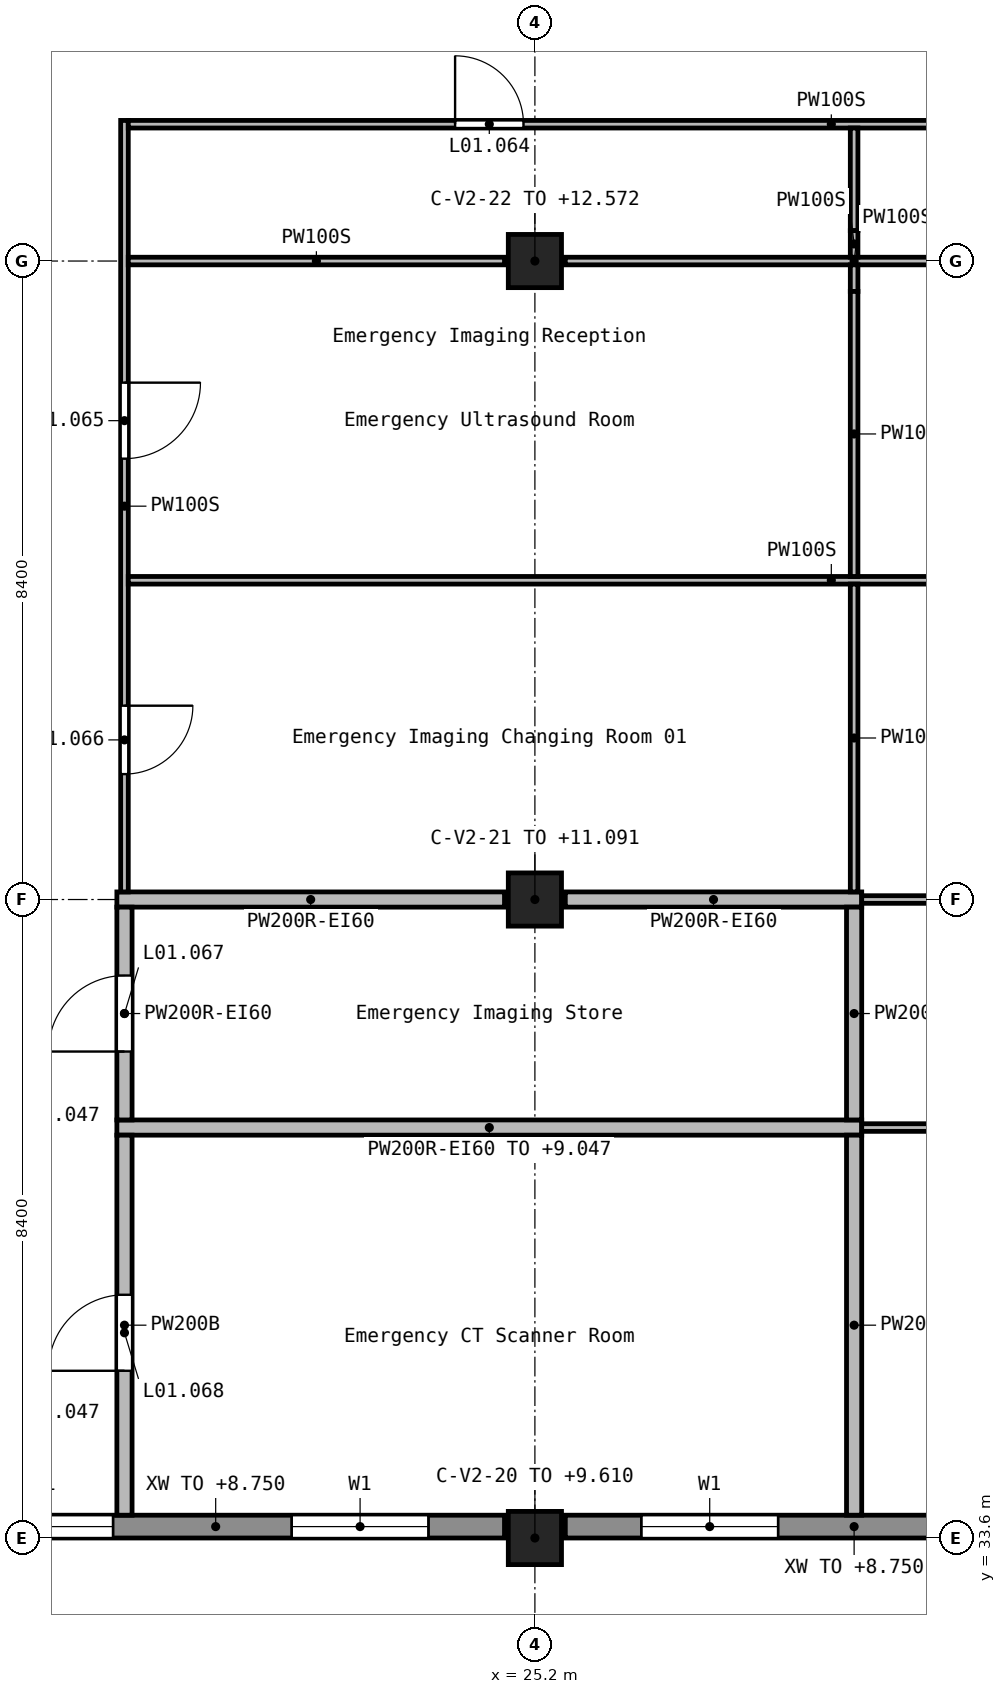
"""IFC4 building model, lengths in metres.
Left out: names, types, materials, properties, quantities, classifications, styles, units other than length and angle.
Written with IfcOpenShell. Run it as: python <this file> out.ifc"""

import sys

from ifc_helpers import new_model, si_unit, direction, frame, frame_2d, origin, origin_2d, place, context, subcontext, project, spatial, rectangle, extrude, element, fill, save


model = new_model("IFC4")
c1 = context("Model", 3, precision=1e-05, world=origin(), true_north=direction((0.0, 1.0)))
c2 = subcontext(c1, "Body", "Model", "MODEL_VIEW")
j1 = project(units=[si_unit("LENGTHUNIT", "METRE"), si_unit("PLANEANGLEUNIT", "RADIAN")], contexts=[c1])
p1 = place(None, origin())
s1 = spatial("IfcSite", under=j1, at=p1, CompositionType="ELEMENT")
p2 = place(p1, origin())
s2 = spatial("IfcBuilding", under=s1, at=p2, CompositionType="ELEMENT")
p3 = place(p2, frame((0.0, 0.0, 5.4)))
s3 = spatial("IfcBuildingStorey", under=s2, at=p3, CompositionType="ELEMENT", Elevation=5.4)
p4 = place(p3, frame((25.2, 33.6, 0.0), z_axis=(0.0, 0.0, 1.0), x_axis=(1.0, 0.0, 0.0)))
e1 = element("IfcColumn", 1, at=p4, inside=s3, PredefinedType="COLUMN", context=c2, shape_type="SweptSolid", body=[
    extrude(rectangle(XDim=0.7, YDim=0.7, at=origin_2d()), origin(), (0.0, 0.0, 1.0), 4.21),
])
p5 = place(p3, frame((25.2, 42.0, 0.0), z_axis=(0.0, 0.0, 1.0), x_axis=(1.0, 0.0, 0.0)))
e2 = element("IfcColumn", 2, at=p5, inside=s3, PredefinedType="COLUMN", context=c2, shape_type="SweptSolid", body=[
    extrude(rectangle(XDim=0.7, YDim=0.7, at=origin_2d()), origin(), (0.0, 0.0, 1.0), 5.691),
])
p6 = place(p3, frame((25.2, 50.4, 0.0), z_axis=(0.0, 0.0, 1.0), x_axis=(1.0, 0.0, 0.0)))
e3 = element("IfcColumn", 3, at=p6, inside=s3, PredefinedType="COLUMN", context=c2, shape_type="SweptSolid", body=[
    extrude(rectangle(XDim=0.7, YDim=0.7, at=origin_2d()), origin(), (0.0, 0.0, 1.0), 7.172),
])
p7 = place(p3, frame((17.2, 33.75, 0.0), z_axis=(0.0, 0.0, 1.0), x_axis=(1.0, 0.0, 0.0)))
e4 = element("IfcWall", 4, at=p7, inside=s3, PredefinedType="STANDARD", context=c2, shape_type="SweptSolid", body=[
    extrude(rectangle(XDim=7.6, YDim=0.3, at=frame_2d((3.8, 0.0))), origin(), (0.0, 0.0, 1.0), 3.35),
])
p8 = place(p7, frame((0.65, 0.0, 0.9)))
e5 = element("IfcOpeningElement", 5, at=p8, cuts=e4, PredefinedType="OPENING", context=c2, shape_type="SweptSolid", body=[
    extrude(rectangle(XDim=1.8, YDim=1.5, at=frame_2d((0.9, 0.75))), frame((0.0, 0.16, 0.0), z_axis=(0.0, -1.0, 0.0), x_axis=(1.0, 0.0, 0.0)), (0.0, 0.0, 1.0), 0.32),
])
p9 = place(p7, frame((4.8, 0.0, 0.9)))
e6 = element("IfcOpeningElement", 6, at=p9, cuts=e4, PredefinedType="OPENING", context=c2, shape_type="SweptSolid", body=[
    extrude(rectangle(XDim=1.8, YDim=1.5, at=frame_2d((0.9, 0.75))), frame((0.0, 0.16, 0.0), z_axis=(0.0, -1.0, 0.0), x_axis=(1.0, 0.0, 0.0)), (0.0, 0.0, 1.0), 0.32),
])
p10 = place(p3, frame((25.6, 33.75, 0.0), z_axis=(0.0, 0.0, 1.0), x_axis=(1.0, 0.0, 0.0)))
e7 = element("IfcWall", 7, at=p10, inside=s3, PredefinedType="STANDARD", context=c2, shape_type="SweptSolid", body=[
    extrude(rectangle(XDim=7.6, YDim=0.3, at=frame_2d((3.8, 0.0))), origin(), (0.0, 0.0, 1.0), 3.35),
])
p11 = place(p10, frame((1.0, 0.0, 0.9)))
e8 = element("IfcOpeningElement", 8, at=p11, cuts=e7, PredefinedType="OPENING", context=c2, shape_type="SweptSolid", body=[
    extrude(rectangle(XDim=1.8, YDim=1.5, at=frame_2d((0.9, 0.75))), frame((0.0, 0.16, 0.0), z_axis=(0.0, -1.0, 0.0), x_axis=(1.0, 0.0, 0.0)), (0.0, 0.0, 1.0), 0.32),
])
p12 = place(p10, frame((4.8, 0.0, 0.9)))
e9 = element("IfcOpeningElement", 9, at=p12, cuts=e7, PredefinedType="OPENING", context=c2, shape_type="SweptSolid", body=[
    extrude(rectangle(XDim=1.8, YDim=1.5, at=frame_2d((0.9, 0.75))), frame((0.0, 0.16, 0.0), z_axis=(0.0, -1.0, 0.0), x_axis=(1.0, 0.0, 0.0)), (0.0, 0.0, 1.0), 0.32),
])
p13 = place(p3, frame((19.7, 39.0, 0.0), z_axis=(0.0, 0.0, 1.0), x_axis=(1.0, 0.0, 0.0)))
e10 = element("IfcWall", 10, at=p13, inside=s3, PredefinedType="SOLIDWALL", context=c2, shape_type="SweptSolid", body=[
    extrude(rectangle(XDim=9.8, YDim=0.2, at=frame_2d((4.9, 0.0))), origin(), (0.0, 0.0, 1.0), 3.647),
])
p14 = place(p3, frame((19.7, 42.0, 0.0), z_axis=(0.0, 0.0, 1.0), x_axis=(1.0, 0.0, 0.0)))
e11 = element("IfcWall", 11, at=p14, inside=s3, PredefinedType="SOLIDWALL", context=c2, shape_type="SweptSolid", body=[
    extrude(rectangle(XDim=5.1, YDim=0.2, at=frame_2d((2.55, 0.0))), origin(), (0.0, 0.0, 1.0), 4.15),
])
p15 = place(p3, frame((25.6, 42.0, 0.0), z_axis=(0.0, 0.0, 1.0), x_axis=(1.0, 0.0, 0.0)))
e12 = element("IfcWall", 12, at=p15, inside=s3, PredefinedType="SOLIDWALL", context=c2, shape_type="SweptSolid", body=[
    extrude(rectangle(XDim=3.9, YDim=0.2, at=frame_2d((1.95, 0.0))), origin(), (0.0, 0.0, 1.0), 4.15),
])
p16 = place(p3, frame((19.8, 39.1, 0.0), z_axis=(0.0, 0.0, 1.0), x_axis=(0.0, 1.0, 0.0)))
e13 = element("IfcWall", 13, at=p16, inside=s3, PredefinedType="SOLIDWALL", context=c2, shape_type="SweptSolid", body=[
    extrude(rectangle(XDim=2.8, YDim=0.2, at=frame_2d((1.4, 0.0))), origin(), (0.0, 0.0, 1.0), 4.15),
])
p17 = place(p16, frame((0.9, 0.0, 0.0)))
e14 = element("IfcOpeningElement", 14, at=p17, cuts=e13, PredefinedType="OPENING", context=c2, shape_type="SweptSolid", body=[
    extrude(rectangle(XDim=1.0, YDim=2.1, at=frame_2d((0.5, 1.05))), frame((0.0, 0.11, 0.0), z_axis=(0.0, -1.0, 0.0), x_axis=(1.0, 0.0, 0.0)), (0.0, 0.0, 1.0), 0.22),
])
p18 = place(p3, frame((29.4, 39.1, 0.0), z_axis=(0.0, 0.0, 1.0), x_axis=(0.0, 1.0, 0.0)))
e15 = element("IfcWall", 15, at=p18, inside=s3, PredefinedType="SOLIDWALL", context=c2, shape_type="SweptSolid", body=[
    extrude(rectangle(XDim=2.8, YDim=0.2, at=frame_2d((1.4, 0.0))), origin(), (0.0, 0.0, 1.0), 4.15),
])
p19 = place(p3, frame((19.8, 33.9, 0.0), z_axis=(0.0, 0.0, 1.0), x_axis=(0.0, 1.0, 0.0)))
e16 = element("IfcWall", 16, at=p19, inside=s3, PredefinedType="SOLIDWALL", context=c2, shape_type="SweptSolid", body=[
    extrude(rectangle(XDim=5.0, YDim=0.2, at=frame_2d((2.5, 0.0))), origin(), (0.0, 0.0, 1.0), 4.15),
])
p20 = place(p19, frame((1.9, 0.0, 0.0)))
e17 = element("IfcOpeningElement", 17, at=p20, cuts=e16, PredefinedType="OPENING", context=c2, shape_type="SweptSolid", body=[
    extrude(rectangle(XDim=1.0, YDim=2.1, at=frame_2d((0.5, 1.05))), frame((0.0, 0.11, 0.0), z_axis=(0.0, -1.0, 0.0), x_axis=(1.0, 0.0, 0.0)), (0.0, 0.0, 1.0), 0.22),
])
p21 = place(p3, frame((29.4, 33.9, 0.0), z_axis=(0.0, 0.0, 1.0), x_axis=(0.0, 1.0, 0.0)))
e18 = element("IfcWall", 18, at=p21, inside=s3, PredefinedType="SOLIDWALL", context=c2, shape_type="SweptSolid", body=[
    extrude(rectangle(XDim=5.0, YDim=0.2, at=frame_2d((2.5, 0.0))), origin(), (0.0, 0.0, 1.0), 4.15),
])
p22 = place(p3, frame((19.8, 52.25, 0.0), z_axis=(0.0, 0.0, 1.0), x_axis=(0.0, -1.0, 0.0)))
e19 = element("IfcWall", 19, at=p22, inside=s3, PredefinedType="PARTITIONING", context=c2, shape_type="SweptSolid", body=[
    extrude(rectangle(XDim=10.15, YDim=0.1, at=frame_2d((5.075, 0.0))), origin(), (0.0, 0.0, 1.0), 4.15),
])
p23 = place(p22, frame((3.45, 0.0, 0.0)))
e20 = element("IfcOpeningElement", 20, at=p23, cuts=e19, PredefinedType="OPENING", context=c2, shape_type="SweptSolid", body=[
    extrude(rectangle(XDim=1.0, YDim=2.1, at=frame_2d((0.5, 1.05))), frame((0.0, 0.06, 0.0), z_axis=(0.0, -1.0, 0.0), x_axis=(1.0, 0.0, 0.0)), (0.0, 0.0, 1.0), 0.12),
])
p24 = place(p22, frame((7.7, 0.0, 0.0)))
e21 = element("IfcOpeningElement", 21, at=p24, cuts=e19, PredefinedType="OPENING", context=c2, shape_type="SweptSolid", body=[
    extrude(rectangle(XDim=0.9, YDim=2.1, at=frame_2d((0.45, 1.05))), frame((0.0, 0.06, 0.0), z_axis=(0.0, -1.0, 0.0), x_axis=(1.0, 0.0, 0.0)), (0.0, 0.0, 1.0), 0.12),
])
p25 = place(p3, frame((19.85, 46.2, 0.0), z_axis=(0.0, 0.0, 1.0), x_axis=(1.0, 0.0, 0.0)))
e22 = element("IfcWall", 22, at=p25, inside=s3, PredefinedType="PARTITIONING", context=c2, shape_type="SweptSolid", body=[
    extrude(rectangle(XDim=18.5, YDim=0.1, at=frame_2d((9.25, 0.0))), origin(), (0.0, 0.0, 1.0), 4.15),
])
p26 = place(p3, frame((19.85, 50.4, 0.0), z_axis=(0.0, 0.0, 1.0), x_axis=(1.0, 0.0, 0.0)))
e23 = element("IfcWall", 23, at=p26, inside=s3, PredefinedType="PARTITIONING", context=c2, shape_type="SweptSolid", body=[
    extrude(rectangle(XDim=4.95, YDim=0.1, at=frame_2d((2.475, 0.0))), origin(), (0.0, 0.0, 1.0), 4.15),
])
p27 = place(p3, frame((25.6, 50.4, 0.0), z_axis=(0.0, 0.0, 1.0), x_axis=(1.0, 0.0, 0.0)))
e24 = element("IfcWall", 24, at=p27, inside=s3, PredefinedType="PARTITIONING", context=c2, shape_type="SweptSolid", body=[
    extrude(rectangle(XDim=7.6, YDim=0.1, at=frame_2d((3.8, 0.0))), origin(), (0.0, 0.0, 1.0), 4.15),
])
p28 = place(p3, frame((19.85, 52.2, 0.0), z_axis=(0.0, 0.0, 1.0), x_axis=(1.0, 0.0, 0.0)))
e25 = element("IfcWall", 25, at=p28, inside=s3, PredefinedType="PARTITIONING", context=c2, shape_type="SweptSolid", body=[
    extrude(rectangle(XDim=18.5, YDim=0.1, at=frame_2d((9.25, 0.0))), origin(), (0.0, 0.0, 1.0), 4.15),
])
p29 = place(p28, frame((4.3, 0.0, 0.0)))
e26 = element("IfcOpeningElement", 26, at=p29, cuts=e25, PredefinedType="OPENING", context=c2, shape_type="SweptSolid", body=[
    extrude(rectangle(XDim=0.9, YDim=2.1, at=frame_2d((0.45, 1.05))), frame((0.0, 0.06, 0.0), z_axis=(0.0, -1.0, 0.0), x_axis=(1.0, 0.0, 0.0)), (0.0, 0.0, 1.0), 0.12),
])
p30 = place(p28, frame((13.35, 0.0, 0.0)))
e27 = element("IfcOpeningElement", 27, at=p30, cuts=e25, PredefinedType="OPENING", context=c2, shape_type="SweptSolid", body=[
    extrude(rectangle(XDim=1.4, YDim=2.1, at=frame_2d((0.7, 1.05))), frame((0.0, 0.06, 0.0), z_axis=(0.0, -1.0, 0.0), x_axis=(1.0, 0.0, 0.0)), (0.0, 0.0, 1.0), 0.12),
])
p31 = place(p3, frame((29.4, 52.15, 0.0), z_axis=(0.0, 0.0, 1.0), x_axis=(0.0, -1.0, 0.0)))
e28 = element("IfcWall", 28, at=p31, inside=s3, PredefinedType="PARTITIONING", context=c2, shape_type="SweptSolid", body=[
    extrude(rectangle(XDim=1.35, YDim=0.1, at=frame_2d((0.675, 0.0))), origin(), (0.0, 0.0, 1.0), 4.15),
])
for number, where, z_axis, x_axis in (
    (29, (29.4, 50.8, 0.0), (0.0, 0.0, 1.0), (0.0, -1.0, 0.0)),
    (30, (29.4, 50.35, 0.0), (0.0, 0.0, 1.0), (0.0, -1.0, 0.0)),
):
    element("IfcWall", number, at=place(p3, frame(where, z_axis=z_axis, x_axis=x_axis)), inside=s3, PredefinedType="PARTITIONING", context=c2, shape_type="SweptSolid", body=[
        extrude(rectangle(XDim=0.35, YDim=0.1, at=frame_2d((0.175, 0.0))), origin(), (0.0, 0.0, 1.0), 4.15),
    ])
p32 = place(p3, frame((29.4, 50.0, 0.0), z_axis=(0.0, 0.0, 1.0), x_axis=(0.0, -1.0, 0.0)))
e31 = element("IfcWall", 31, at=p32, inside=s3, PredefinedType="PARTITIONING", context=c2, shape_type="SweptSolid", body=[
    extrude(rectangle(XDim=3.75, YDim=0.1, at=frame_2d((1.875, 0.0))), origin(), (0.0, 0.0, 1.0), 4.15),
])
p33 = place(p3, frame((29.4, 46.15, 0.0), z_axis=(0.0, 0.0, 1.0), x_axis=(0.0, -1.0, 0.0)))
e32 = element("IfcWall", 32, at=p33, inside=s3, PredefinedType="PARTITIONING", context=c2, shape_type="SweptSolid", body=[
    extrude(rectangle(XDim=4.05, YDim=0.1, at=frame_2d((2.025, 0.0))), origin(), (0.0, 0.0, 1.0), 4.15),
])
p34 = place(p3, frame((29.5, 39.0, 0.0), z_axis=(0.0, 0.0, 1.0), x_axis=(1.0, 0.0, 0.0)))
e33 = element("IfcWall", 33, at=p34, inside=s3, PredefinedType="PARTITIONING", context=c2, shape_type="SweptSolid", body=[
    extrude(rectangle(XDim=8.85, YDim=0.1, at=frame_2d((4.425, 0.0))), origin(), (0.0, 0.0, 1.0), 3.647),
])
p35 = place(p3, frame((29.5, 42.0, 0.0), z_axis=(0.0, 0.0, 1.0), x_axis=(1.0, 0.0, 0.0)))
e34 = element("IfcWall", 34, at=p35, inside=s3, PredefinedType="PARTITIONING", context=c2, shape_type="SweptSolid", body=[
    extrude(rectangle(XDim=3.7, YDim=0.1, at=frame_2d((1.85, 0.0))), origin(), (0.0, 0.0, 1.0), 4.15),
])
p36 = place(p8, origin())
e35 = element("IfcWindow", 35, at=p36, inside=s3, PartitioningType="SINGLE_PANEL", PredefinedType="WINDOW", context=c2, shape_type="SweptSolid", body=[
    extrude(rectangle(XDim=1.8, YDim=1.5, at=frame_2d((0.9, 0.75))), frame((0.0, 0.03, 0.0), z_axis=(0.0, -1.0, 0.0), x_axis=(1.0, 0.0, 0.0)), (0.0, 0.0, 1.0), 0.06),
])
fill(e5, e35)
p37 = place(p9, origin())
e36 = element("IfcWindow", 36, at=p37, inside=s3, PartitioningType="SINGLE_PANEL", PredefinedType="WINDOW", context=c2, shape_type="SweptSolid", body=[
    extrude(rectangle(XDim=1.8, YDim=1.5, at=frame_2d((0.9, 0.75))), frame((0.0, 0.03, 0.0), z_axis=(0.0, -1.0, 0.0), x_axis=(1.0, 0.0, 0.0)), (0.0, 0.0, 1.0), 0.06),
])
fill(e6, e36)
p38 = place(p11, origin())
e37 = element("IfcWindow", 37, at=p38, inside=s3, PartitioningType="SINGLE_PANEL", PredefinedType="WINDOW", context=c2, shape_type="SweptSolid", body=[
    extrude(rectangle(XDim=1.8, YDim=1.5, at=frame_2d((0.9, 0.75))), frame((0.0, 0.03, 0.0), z_axis=(0.0, -1.0, 0.0), x_axis=(1.0, 0.0, 0.0)), (0.0, 0.0, 1.0), 0.06),
])
fill(e8, e37)
p39 = place(p29, frame((0.9, 0.0, 0.0), z_axis=(0.0, 0.0, 1.0), x_axis=(-1.0, 0.0, 0.0)))
e38 = element("IfcDoor", 38, at=p39, inside=s3, OperationType="SINGLE_SWING_RIGHT", PredefinedType="DOOR", context=c2, shape_type="SweptSolid", body=[
    extrude(rectangle(XDim=0.9, YDim=2.1, at=frame_2d((0.45, 1.05))), frame((0.0, 0.025, 0.0), z_axis=(0.0, -1.0, 0.0), x_axis=(1.0, 0.0, 0.0)), (0.0, 0.0, 1.0), 0.05),
])
fill(e26, e38)
p40 = place(p23, origin())
e39 = element("IfcDoor", 39, at=p40, inside=s3, OperationType="SINGLE_SWING_LEFT", PredefinedType="DOOR", context=c2, shape_type="SweptSolid", body=[
    extrude(rectangle(XDim=1.0, YDim=2.1, at=frame_2d((0.5, 1.05))), frame((0.0, 0.025, 0.0), z_axis=(0.0, -1.0, 0.0), x_axis=(1.0, 0.0, 0.0)), (0.0, 0.0, 1.0), 0.05),
])
fill(e20, e39)
p41 = place(p24, origin())
e40 = element("IfcDoor", 40, at=p41, inside=s3, OperationType="SINGLE_SWING_RIGHT", PredefinedType="DOOR", context=c2, shape_type="SweptSolid", body=[
    extrude(rectangle(XDim=0.9, YDim=2.1, at=frame_2d((0.45, 1.05))), frame((0.0, 0.025, 0.0), z_axis=(0.0, -1.0, 0.0), x_axis=(1.0, 0.0, 0.0)), (0.0, 0.0, 1.0), 0.05),
])
fill(e21, e40)
p42 = place(p17, frame((1.0, 0.0, 0.0), z_axis=(0.0, 0.0, 1.0), x_axis=(-1.0, 0.0, 0.0)))
e41 = element("IfcDoor", 41, at=p42, inside=s3, OperationType="SINGLE_SWING_RIGHT", PredefinedType="DOOR", context=c2, shape_type="SweptSolid", body=[
    extrude(rectangle(XDim=1.0, YDim=2.1, at=frame_2d((0.5, 1.05))), frame((0.0, 0.025, 0.0), z_axis=(0.0, -1.0, 0.0), x_axis=(1.0, 0.0, 0.0)), (0.0, 0.0, 1.0), 0.05),
])
fill(e14, e41)
p43 = place(p20, frame((1.0, 0.0, 0.0), z_axis=(0.0, 0.0, 1.0), x_axis=(-1.0, 0.0, 0.0)))
e42 = element("IfcDoor", 42, at=p43, inside=s3, OperationType="SINGLE_SWING_RIGHT", PredefinedType="DOOR", context=c2, shape_type="SweptSolid", body=[
    extrude(rectangle(XDim=1.0, YDim=2.1, at=frame_2d((0.5, 1.05))), frame((0.0, 0.025, 0.0), z_axis=(0.0, -1.0, 0.0), x_axis=(1.0, 0.0, 0.0)), (0.0, 0.0, 1.0), 0.05),
])
fill(e17, e42)
save(model, sys.argv[1])
